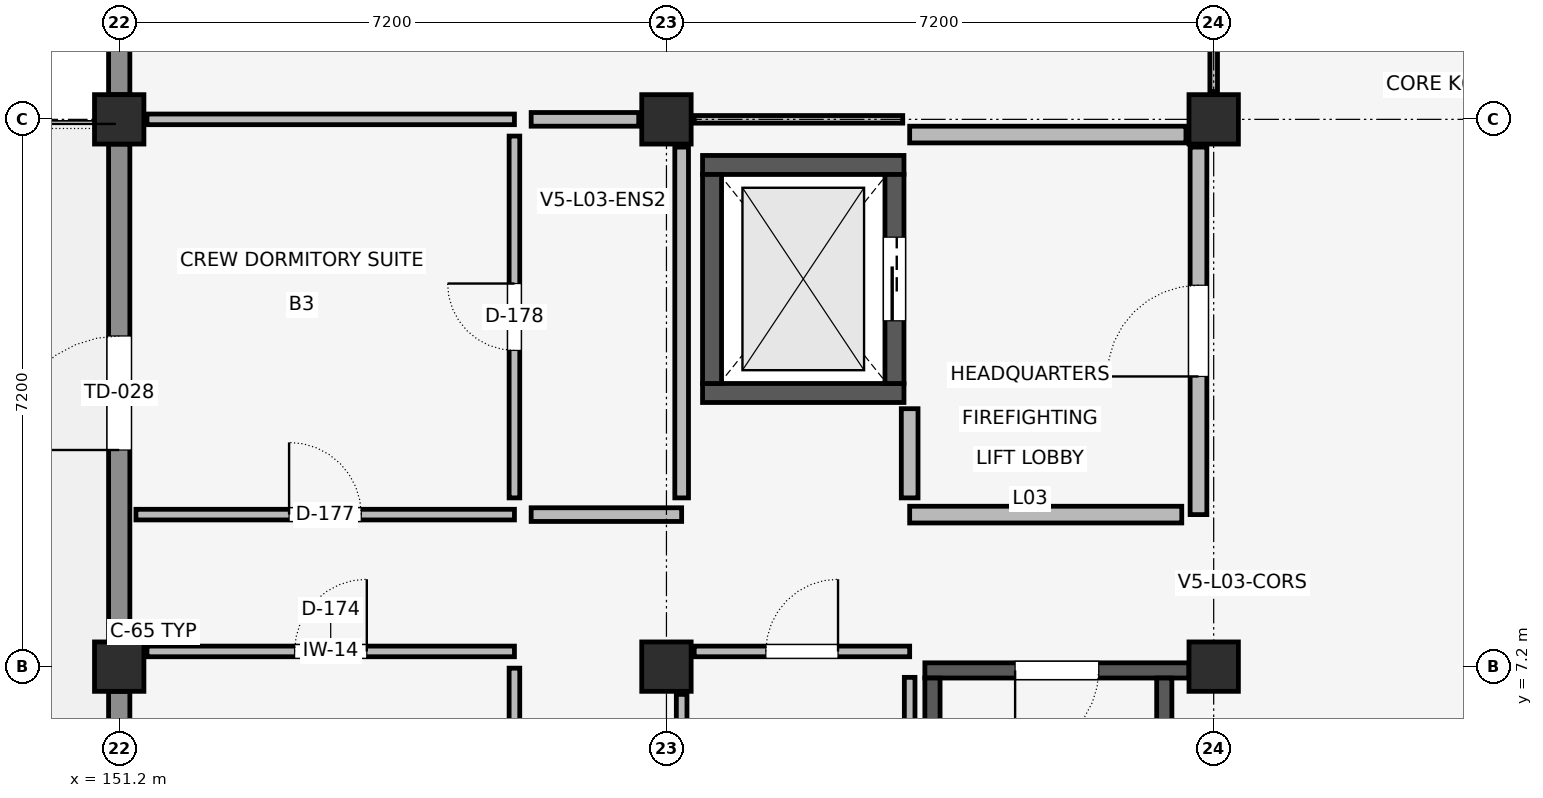
"""IFC4 building model, lengths in metres.
Left out: names, types, materials, properties, quantities, classifications, styles, units other than length and angle.
Written with IfcOpenShell. Run it as: python <this file> out.ifc"""

import sys

from ifc_helpers import new_model, si_unit, direction, frame, frame_2d, origin, origin_2d, place, context, subcontext, project, spatial, rectangle, extrude, element, fill, save


model = new_model("IFC4")
c1 = context("Model", 3, precision=1e-05, world=origin(), true_north=direction((0.0, 1.0)))
c2 = subcontext(c1, "Body", "Model", "MODEL_VIEW")
j1 = project(units=[si_unit("LENGTHUNIT", "METRE"), si_unit("PLANEANGLEUNIT", "RADIAN")], contexts=[c1])
p1 = place(None, origin())
s1 = spatial("IfcSite", under=j1, at=p1, CompositionType="ELEMENT")
p2 = place(p1, origin())
s2 = spatial("IfcBuilding", under=s1, at=p2, CompositionType="ELEMENT")
p3 = place(p2, frame((0.0, 0.0, 13.5)))
s3 = spatial("IfcBuildingStorey", under=s2, at=p3, CompositionType="ELEMENT", Elevation=13.5)
for number, where, z_axis, x_axis in (
    (1, (151.2, 7.2, 0.0), (0.0, 0.0, 1.0), (1.0, 0.0, 0.0)),
    (2, (151.2, 14.4, 0.0), (0.0, 0.0, 1.0), (1.0, 0.0, 0.0)),
    (3, (158.4, 7.2, 0.0), (0.0, 0.0, 1.0), (1.0, 0.0, 0.0)),
    (4, (158.4, 14.4, 0.0), (0.0, 0.0, 1.0), (1.0, 0.0, 0.0)),
    (5, (165.6, 7.2, 0.0), (0.0, 0.0, 1.0), (1.0, 0.0, 0.0)),
    (6, (165.6, 14.4, 0.0), (0.0, 0.0, 1.0), (1.0, 0.0, 0.0)),
):
    element("IfcColumn", number, at=place(p3, frame(where, z_axis=z_axis, x_axis=x_axis)), inside=s3, PredefinedType="COLUMN", context=c2, shape_type="SweptSolid", body=[
        extrude(rectangle(XDim=0.65, YDim=0.65, at=origin_2d()), origin(), (0.0, 0.0, 1.0), 3.9),
    ])
for number, where, z_axis, x_axis in (
    (7, (158.875, 10.8, 0.0), (0.0, 0.0, 1.0), (1.0, 0.0, 0.0)),
    (8, (158.875, 13.8, 0.0), (0.0, 0.0, 1.0), (1.0, 0.0, 0.0)),
):
    element("IfcWall", number, at=place(p3, frame(where, z_axis=z_axis, x_axis=x_axis)), inside=s3, PredefinedType="SHEAR", context=c2, shape_type="SweptSolid", body=[
        extrude(rectangle(XDim=2.65, YDim=0.25, at=frame_2d((1.325, 0.0))), origin(), (0.0, 0.0, 1.0), 3.62),
    ])
p4 = place(p3, frame((159.0, 10.925, 0.0), z_axis=(0.0, 0.0, 1.0), x_axis=(0.0, 1.0, 0.0)))
e9 = element("IfcWall", 9, at=p4, inside=s3, PredefinedType="SHEAR", context=c2, shape_type="SweptSolid", body=[
    extrude(rectangle(XDim=2.75, YDim=0.25, at=frame_2d((1.375, 0.0))), origin(), (0.0, 0.0, 1.0), 3.62),
])
p5 = place(p3, frame((161.4, 10.925, 0.0), z_axis=(0.0, 0.0, 1.0), x_axis=(0.0, 1.0, 0.0)))
e10 = element("IfcWall", 10, at=p5, inside=s3, PredefinedType="SHEAR", context=c2, shape_type="SweptSolid", body=[
    extrude(rectangle(XDim=2.75, YDim=0.25, at=frame_2d((1.375, 0.0))), origin(), (0.0, 0.0, 1.0), 3.62),
])
p6 = place(p5, frame((0.825, 0.0, 0.0)))
e11 = element("IfcOpeningElement", 11, at=p6, cuts=e10, PredefinedType="OPENING", context=c2, shape_type="SweptSolid", body=[
    extrude(rectangle(XDim=1.1, YDim=2.15, at=frame_2d((0.55, 1.075))), frame((0.0, 0.137, 0.0), z_axis=(0.0, -1.0, 0.0), x_axis=(1.0, 0.0, 0.0)), (0.0, 0.0, 1.0), 0.274),
])
p7 = place(p3, frame((161.8, 7.15, 0.0), z_axis=(0.0, 0.0, 1.0), x_axis=(1.0, 0.0, 0.0)))
e12 = element("IfcWall", 12, at=p7, inside=s3, PredefinedType="SHEAR", context=c2, shape_type="SweptSolid", body=[
    extrude(rectangle(XDim=3.475, YDim=0.2, at=frame_2d((1.737, 0.0))), origin(), (0.0, 0.0, 1.0), 3.62),
])
p8 = place(p7, frame((1.188, 0.0, 0.0)))
e13 = element("IfcOpeningElement", 13, at=p8, cuts=e12, PredefinedType="OPENING", context=c2, shape_type="SweptSolid", body=[
    extrude(rectangle(XDim=1.1, YDim=2.15, at=frame_2d((0.55, 1.075))), frame((0.0, 0.112, 0.0), z_axis=(0.0, -1.0, 0.0), x_axis=(1.0, 0.0, 0.0)), (0.0, 0.0, 1.0), 0.224),
])
for number, where, z_axis, x_axis in (
    (14, (161.9, 0.43, 0.0), (0.0, 0.0, 1.0), (0.0, 1.0, 0.0)),
    (15, (164.95, 0.43, 0.0), (0.0, 0.0, 1.0), (0.0, 1.0, 0.0)),
):
    element("IfcWall", number, at=place(p3, frame(where, z_axis=z_axis, x_axis=x_axis)), inside=s3, PredefinedType="SHEAR", context=c2, shape_type="SweptSolid", body=[
        extrude(rectangle(XDim=6.62, YDim=0.2, at=frame_2d((3.31, 0.0))), origin(), (0.0, 0.0, 1.0), 3.62),
    ])
p9 = place(p3, frame((151.2, 21.275, 0.0), z_axis=(0.0, 0.0, 1.0), x_axis=(0.0, -1.0, 0.0)))
e16 = element("IfcWall", 16, at=p9, inside=s3, PredefinedType="ELEMENTEDWALL", context=c2, shape_type="SweptSolid", body=[
    extrude(rectangle(XDim=6.55, YDim=0.28, at=frame_2d((3.275, 0.0))), origin(), (0.0, 0.0, 1.0), 2.96),
])
p10 = place(p3, frame((151.2, 14.075, 0.0), z_axis=(0.0, 0.0, 1.0), x_axis=(0.0, -1.0, 0.0)))
e17 = element("IfcWall", 17, at=p10, inside=s3, PredefinedType="ELEMENTEDWALL", context=c2, shape_type="SweptSolid", body=[
    extrude(rectangle(XDim=6.55, YDim=0.28, at=frame_2d((3.275, 0.0))), origin(), (0.0, 0.0, 1.0), 3.01),
])
p11 = place(p10, frame((2.525, 0.0, 0.0)))
e18 = element("IfcOpeningElement", 18, at=p11, cuts=e17, PredefinedType="OPENING", context=c2, shape_type="SweptSolid", body=[
    extrude(rectangle(XDim=1.5, YDim=2.2, at=frame_2d((0.75, 1.1))), frame((0.0, 0.152, 0.0), z_axis=(0.0, -1.0, 0.0), x_axis=(1.0, 0.0, 0.0)), (0.0, 0.0, 1.0), 0.304),
])
p12 = place(p3, frame((151.2, 6.875, 0.0), z_axis=(0.0, 0.0, 1.0), x_axis=(0.0, -1.0, 0.0)))
e19 = element("IfcWall", 19, at=p12, inside=s3, PredefinedType="ELEMENTEDWALL", context=c2, shape_type="SweptSolid", body=[
    extrude(rectangle(XDim=6.55, YDim=0.28, at=frame_2d((3.275, 0.0))), origin(), (0.0, 0.0, 1.0), 2.96),
])
p13 = place(p12, frame((2.575, 0.0, 0.85)))
e20 = element("IfcOpeningElement", 20, at=p13, cuts=e19, PredefinedType="OPENING", context=c2, shape_type="SweptSolid", body=[
    extrude(rectangle(XDim=1.4, YDim=1.65, at=frame_2d((0.7, 0.825))), frame((0.0, 0.152, 0.0), z_axis=(0.0, -1.0, 0.0), x_axis=(1.0, 0.0, 0.0)), (0.0, 0.0, 1.0), 0.304),
])
p14 = place(p3, frame((165.4, 9.2, 0.0), z_axis=(0.0, 0.0, 1.0), x_axis=(0.0, 1.0, 0.0)))
e21 = element("IfcWall", 21, at=p14, inside=s3, PredefinedType="STANDARD", context=c2, shape_type="SweptSolid", body=[
    extrude(rectangle(XDim=4.835, YDim=0.22, at=frame_2d((2.417, 0.0))), origin(), (0.0, 0.0, 1.0), 3.008),
])
p15 = place(p14, frame((1.817, 0.0, 0.0)))
e22 = element("IfcOpeningElement", 22, at=p15, cuts=e21, PredefinedType="OPENING", context=c2, shape_type="SweptSolid", body=[
    extrude(rectangle(XDim=1.2, YDim=2.2, at=frame_2d((0.6, 1.1))), frame((0.0, 0.122, 0.0), z_axis=(0.0, -1.0, 0.0), x_axis=(1.0, 0.0, 0.0)), (0.0, 0.0, 1.0), 0.244),
])
p16 = place(p3, frame((161.6, 9.2, 0.0), z_axis=(0.0, 0.0, 1.0), x_axis=(1.0, 0.0, 0.0)))
e23 = element("IfcWall", 23, at=p16, inside=s3, PredefinedType="STANDARD", context=c2, shape_type="SweptSolid", body=[
    extrude(rectangle(XDim=3.58, YDim=0.22, at=frame_2d((1.79, 0.0))), origin(), (0.0, 0.0, 1.0), 3.612),
])
p17 = place(p3, frame((161.6, 14.2, 0.0), z_axis=(0.0, 0.0, 1.0), x_axis=(1.0, 0.0, 0.0)))
e24 = element("IfcWall", 24, at=p17, inside=s3, PredefinedType="STANDARD", context=c2, shape_type="SweptSolid", body=[
    extrude(rectangle(XDim=3.635, YDim=0.22, at=frame_2d((1.817, 0.0))), origin(), (0.0, 0.0, 1.0), 2.908),
])
p18 = place(p3, frame((161.6, 9.42, 0.0), z_axis=(0.0, 0.0, 1.0), x_axis=(0.0, 1.0, 0.0)))
e25 = element("IfcWall", 25, at=p18, inside=s3, PredefinedType="STANDARD", context=c2, shape_type="SweptSolid", body=[
    extrude(rectangle(XDim=1.174, YDim=0.22, at=frame_2d((0.587, 0.0))), origin(), (0.0, 0.0, 1.0), 3.612),
])
p19 = place(p3, frame((151.565, 7.4, 0.0), z_axis=(0.0, 0.0, 1.0), x_axis=(1.0, 0.0, 0.0)))
e26 = element("IfcWall", 26, at=p19, inside=s3, PredefinedType="PARTITIONING", context=c2, shape_type="SweptSolid", body=[
    extrude(rectangle(XDim=4.835, YDim=0.14, at=frame_2d((2.417, 0.0))), origin(), (0.0, 0.0, 1.0), 2.858),
])
p20 = place(p19, frame((1.942, 0.0, 0.0)))
e27 = element("IfcOpeningElement", 27, at=p20, cuts=e26, PredefinedType="OPENING", context=c2, shape_type="SweptSolid", body=[
    extrude(rectangle(XDim=0.95, YDim=2.1, at=frame_2d((0.475, 1.05))), frame((0.0, 0.082, 0.0), z_axis=(0.0, -1.0, 0.0), x_axis=(1.0, 0.0, 0.0)), (0.0, 0.0, 1.0), 0.164),
])
p21 = place(p3, frame((156.4, 0.22, 0.0), z_axis=(0.0, 0.0, 1.0), x_axis=(0.0, 1.0, 0.0)))
e28 = element("IfcWall", 28, at=p21, inside=s3, PredefinedType="PARTITIONING", context=c2, shape_type="SweptSolid", body=[
    extrude(rectangle(XDim=6.96, YDim=0.14, at=frame_2d((3.48, 0.0))), origin(), (0.0, 0.0, 1.0), 2.858),
])
p22 = place(p21, frame((3.04, 0.0, 0.0)))
e29 = element("IfcOpeningElement", 29, at=p22, cuts=e28, PredefinedType="OPENING", context=c2, shape_type="SweptSolid", body=[
    extrude(rectangle(XDim=0.88, YDim=2.08, at=frame_2d((0.44, 1.04))), frame((0.0, 0.082, 0.0), z_axis=(0.0, -1.0, 0.0), x_axis=(1.0, 0.0, 0.0)), (0.0, 0.0, 1.0), 0.164),
])
p23 = place(p3, frame((158.765, 7.4, 0.0), z_axis=(0.0, 0.0, 1.0), x_axis=(1.0, 0.0, 0.0)))
e30 = element("IfcWall", 30, at=p23, inside=s3, PredefinedType="PARTITIONING", context=c2, shape_type="SweptSolid", body=[
    extrude(rectangle(XDim=2.835, YDim=0.14, at=frame_2d((1.417, 0.0))), origin(), (0.0, 0.0, 1.0), 3.612),
])
p24 = place(p23, frame((0.942, 0.0, 0.0)))
e31 = element("IfcOpeningElement", 31, at=p24, cuts=e30, PredefinedType="OPENING", context=c2, shape_type="SweptSolid", body=[
    extrude(rectangle(XDim=0.95, YDim=2.1, at=frame_2d((0.475, 1.05))), frame((0.0, 0.082, 0.0), z_axis=(0.0, -1.0, 0.0), x_axis=(1.0, 0.0, 0.0)), (0.0, 0.0, 1.0), 0.164),
])
p25 = place(p3, frame((161.6, 0.421, 0.0), z_axis=(0.0, 0.0, 1.0), x_axis=(0.0, 1.0, 0.0)))
e32 = element("IfcWall", 32, at=p25, inside=s3, PredefinedType="PARTITIONING", context=c2, shape_type="SweptSolid", body=[
    extrude(rectangle(XDim=6.638, YDim=0.14, at=frame_2d((3.319, 0.0))), origin(), (0.0, 0.0, 1.0), 3.612),
])
p26 = place(p3, frame((158.6, 4.42, 0.0), z_axis=(0.0, 0.0, 1.0), x_axis=(0.0, 1.0, 0.0)))
e33 = element("IfcWall", 33, at=p26, inside=s3, PredefinedType="PARTITIONING", context=c2, shape_type="SweptSolid", body=[
    extrude(rectangle(XDim=2.415, YDim=0.14, at=frame_2d((1.208, 0.0))), origin(), (0.0, 0.0, 1.0), 2.958),
])
p27 = place(p3, frame((151.42, 9.2, 0.0), z_axis=(0.0, 0.0, 1.0), x_axis=(1.0, 0.0, 0.0)))
e34 = element("IfcWall", 34, at=p27, inside=s3, PredefinedType="PARTITIONING", context=c2, shape_type="SweptSolid", body=[
    extrude(rectangle(XDim=4.98, YDim=0.14, at=frame_2d((2.49, 0.0))), origin(), (0.0, 0.0, 1.0), 3.058),
])
p28 = place(p27, frame((2.015, 0.0, 0.0)))
e35 = element("IfcOpeningElement", 35, at=p28, cuts=e34, PredefinedType="OPENING", context=c2, shape_type="SweptSolid", body=[
    extrude(rectangle(XDim=0.95, YDim=2.1, at=frame_2d((0.475, 1.05))), frame((0.0, 0.082, 0.0), z_axis=(0.0, -1.0, 0.0), x_axis=(1.0, 0.0, 0.0)), (0.0, 0.0, 1.0), 0.164),
])
p29 = place(p3, frame((151.565, 14.4, 0.0), z_axis=(0.0, 0.0, 1.0), x_axis=(1.0, 0.0, 0.0)))
e36 = element("IfcWall", 36, at=p29, inside=s3, PredefinedType="PARTITIONING", context=c2, shape_type="SweptSolid", body=[
    extrude(rectangle(XDim=4.835, YDim=0.14, at=frame_2d((2.417, 0.0))), origin(), (0.0, 0.0, 1.0), 2.858),
])
p30 = place(p3, frame((156.4, 9.42, 0.0), z_axis=(0.0, 0.0, 1.0), x_axis=(0.0, 1.0, 0.0)))
e37 = element("IfcWall", 37, at=p30, inside=s3, PredefinedType="PARTITIONING", context=c2, shape_type="SweptSolid", body=[
    extrude(rectangle(XDim=4.76, YDim=0.14, at=frame_2d((2.38, 0.0))), origin(), (0.0, 0.0, 1.0), 2.858),
])
p31 = place(p30, frame((1.94, 0.0, 0.0)))
e38 = element("IfcOpeningElement", 38, at=p31, cuts=e37, PredefinedType="OPENING", context=c2, shape_type="SweptSolid", body=[
    extrude(rectangle(XDim=0.88, YDim=2.08, at=frame_2d((0.44, 1.04))), frame((0.0, 0.082, 0.0), z_axis=(0.0, -1.0, 0.0), x_axis=(1.0, 0.0, 0.0)), (0.0, 0.0, 1.0), 0.164),
])
p32 = place(p3, frame((156.62, 9.2, 0.0), z_axis=(0.0, 0.0, 1.0), x_axis=(1.0, 0.0, 0.0)))
e39 = element("IfcWall", 39, at=p32, inside=s3, PredefinedType="PLUMBINGWALL", context=c2, shape_type="SweptSolid", body=[
    extrude(rectangle(XDim=1.98, YDim=0.18, at=frame_2d((0.99, 0.0))), origin(), (0.0, 0.0, 1.0), 3.008),
])
p33 = place(p3, frame((156.62, 14.4, 0.0), z_axis=(0.0, 0.0, 1.0), x_axis=(1.0, 0.0, 0.0)))
e40 = element("IfcWall", 40, at=p33, inside=s3, PredefinedType="PLUMBINGWALL", context=c2, shape_type="SweptSolid", body=[
    extrude(rectangle(XDim=1.415, YDim=0.18, at=frame_2d((0.708, 0.0))), origin(), (0.0, 0.0, 1.0), 2.858),
])
p34 = place(p3, frame((158.6, 9.42, 0.0), z_axis=(0.0, 0.0, 1.0), x_axis=(0.0, 1.0, 0.0)))
e41 = element("IfcWall", 41, at=p34, inside=s3, PredefinedType="PLUMBINGWALL", context=c2, shape_type="SweptSolid", body=[
    extrude(rectangle(XDim=4.615, YDim=0.18, at=frame_2d((2.308, 0.0))), origin(), (0.0, 0.0, 1.0), 3.008),
])
p35 = place(p3, frame((165.6, 14.765, 0.0), z_axis=(0.0, 0.0, 1.0), x_axis=(0.0, 1.0, 0.0)))
e42 = element("IfcWall", 42, at=p35, inside=s3, PredefinedType="PARTITIONING", context=c2, shape_type="SweptSolid", body=[
    extrude(rectangle(XDim=6.47, YDim=0.1, at=frame_2d((3.235, 0.0))), origin(), (0.0, 0.0, 1.0), 2.958),
])
p36 = place(p35, frame((2.61, 0.0, 0.0)))
e43 = element("IfcOpeningElement", 43, at=p36, cuts=e42, PredefinedType="OPENING", context=c2, shape_type="SweptSolid", body=[
    extrude(rectangle(XDim=1.25, YDim=2.15, at=frame_2d((0.625, 1.075))), frame((0.0, 0.062, 0.0), z_axis=(0.0, -1.0, 0.0), x_axis=(1.0, 0.0, 0.0)), (0.0, 0.0, 1.0), 0.124),
])
p37 = place(p3, frame((158.765, 14.4, 0.0), z_axis=(0.0, 0.0, 1.0), x_axis=(1.0, 0.0, 0.0)))
e44 = element("IfcWall", 44, at=p37, inside=s3, PredefinedType="PARTITIONING", context=c2, shape_type="SweptSolid", body=[
    extrude(rectangle(XDim=2.744, YDim=0.1, at=frame_2d((1.372, 0.0))), origin(), (0.0, 0.0, 1.0), 2.908),
])
p38 = place(p11, frame((1.5, 0.0, 0.0), z_axis=(0.0, 0.0, 1.0), x_axis=(-1.0, 0.0, 0.0)))
e45 = element("IfcDoor", 45, at=p38, inside=s3, OperationType="DOUBLE_SWING_LEFT", PredefinedType="DOOR", context=c2, shape_type="SweptSolid", body=[
    extrude(rectangle(XDim=1.5, YDim=2.2, at=frame_2d((0.75, 1.1))), frame((0.0, 0.025, 0.0), z_axis=(0.0, -1.0, 0.0), x_axis=(1.0, 0.0, 0.0)), (0.0, 0.0, 1.0), 0.05),
])
fill(e18, e45)
p39 = place(p8, frame((1.1, 0.0, 0.0), z_axis=(0.0, 0.0, 1.0), x_axis=(-1.0, 0.0, 0.0)))
e46 = element("IfcDoor", 46, at=p39, inside=s3, OperationType="SINGLE_SWING_RIGHT", PredefinedType="DOOR", context=c2, shape_type="SweptSolid", body=[
    extrude(rectangle(XDim=1.1, YDim=2.15, at=frame_2d((0.55, 1.075))), frame((0.0, 0.025, 0.0), z_axis=(0.0, -1.0, 0.0), x_axis=(1.0, 0.0, 0.0)), (0.0, 0.0, 1.0), 0.05),
])
fill(e13, e46)
p40 = place(p6, origin())
e47 = element("IfcDoor", 47, at=p40, inside=s3, OperationType="SLIDING_TO_LEFT", PredefinedType="DOOR", context=c2, shape_type="SweptSolid", body=[
    extrude(rectangle(XDim=1.1, YDim=2.15, at=frame_2d((0.55, 1.075))), frame((0.0, 0.025, 0.0), z_axis=(0.0, -1.0, 0.0), x_axis=(1.0, 0.0, 0.0)), (0.0, 0.0, 1.0), 0.05),
])
fill(e11, e47)
p41 = place(p15, origin())
e48 = element("IfcDoor", 48, at=p41, inside=s3, OperationType="SINGLE_SWING_LEFT", PredefinedType="DOOR", context=c2, shape_type="SweptSolid", body=[
    extrude(rectangle(XDim=1.2, YDim=2.2, at=frame_2d((0.6, 1.1))), frame((0.0, 0.025, 0.0), z_axis=(0.0, -1.0, 0.0), x_axis=(1.0, 0.0, 0.0)), (0.0, 0.0, 1.0), 0.05),
])
fill(e22, e48)
p42 = place(p20, origin())
e49 = element("IfcDoor", 49, at=p42, inside=s3, OperationType="SINGLE_SWING_RIGHT", PredefinedType="DOOR", context=c2, shape_type="SweptSolid", body=[
    extrude(rectangle(XDim=0.95, YDim=2.1, at=frame_2d((0.475, 1.05))), frame((0.0, 0.025, 0.0), z_axis=(0.0, -1.0, 0.0), x_axis=(1.0, 0.0, 0.0)), (0.0, 0.0, 1.0), 0.05),
])
fill(e27, e49)
p43 = place(p24, origin())
e50 = element("IfcDoor", 50, at=p43, inside=s3, OperationType="SINGLE_SWING_RIGHT", PredefinedType="DOOR", context=c2, shape_type="SweptSolid", body=[
    extrude(rectangle(XDim=0.95, YDim=2.1, at=frame_2d((0.475, 1.05))), frame((0.0, 0.025, 0.0), z_axis=(0.0, -1.0, 0.0), x_axis=(1.0, 0.0, 0.0)), (0.0, 0.0, 1.0), 0.05),
])
fill(e31, e50)
p44 = place(p28, origin())
e51 = element("IfcDoor", 51, at=p44, inside=s3, OperationType="SINGLE_SWING_LEFT", PredefinedType="DOOR", context=c2, shape_type="SweptSolid", body=[
    extrude(rectangle(XDim=0.95, YDim=2.1, at=frame_2d((0.475, 1.05))), frame((0.0, 0.025, 0.0), z_axis=(0.0, -1.0, 0.0), x_axis=(1.0, 0.0, 0.0)), (0.0, 0.0, 1.0), 0.05),
])
fill(e35, e51)
p45 = place(p31, origin())
e52 = element("IfcDoor", 52, at=p45, inside=s3, OperationType="SINGLE_SWING_RIGHT", PredefinedType="DOOR", context=c2, shape_type="SweptSolid", body=[
    extrude(rectangle(XDim=0.88, YDim=2.08, at=frame_2d((0.44, 1.04))), frame((0.0, 0.025, 0.0), z_axis=(0.0, -1.0, 0.0), x_axis=(1.0, 0.0, 0.0)), (0.0, 0.0, 1.0), 0.05),
])
fill(e38, e52)
save(model, sys.argv[1])
